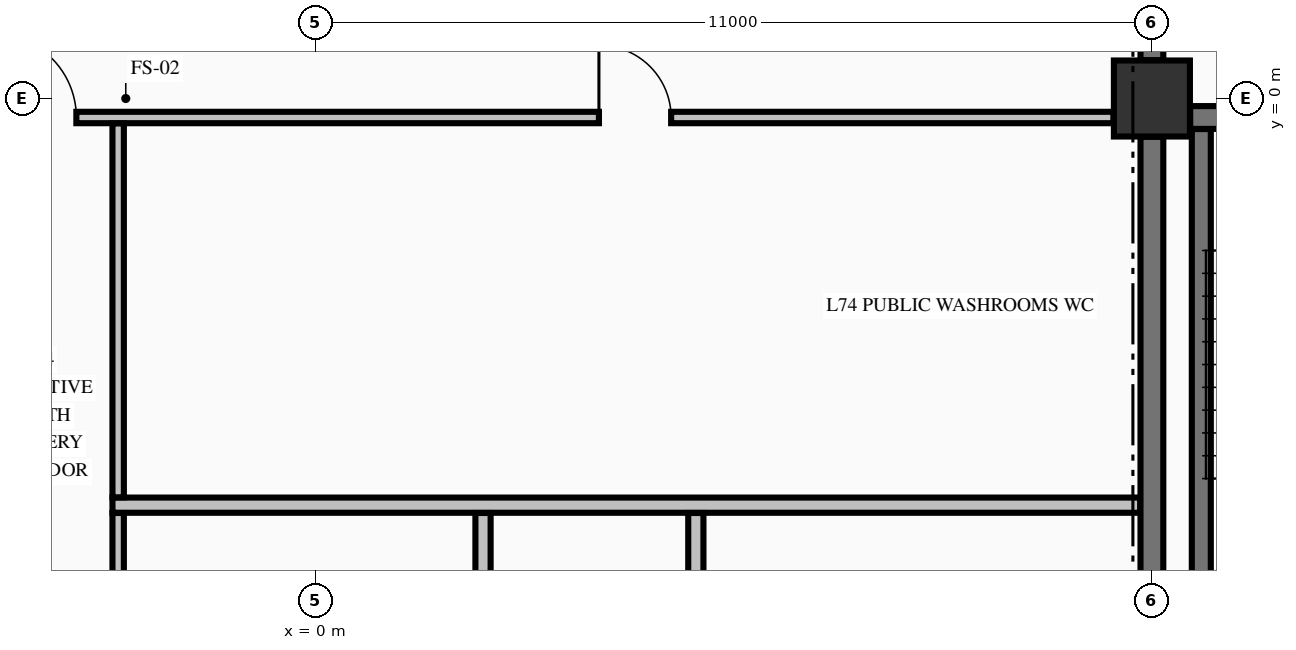
"""IFC4 building model, lengths in metres.
Left out: names, types, materials, properties, quantities, classifications, styles, units other than length and angle.
Written with IfcOpenShell. Run it as: python <this file> out.ifc"""

import sys

from ifc_helpers import new_model, si_unit, direction, frame, frame_2d, origin, origin_2d, place, context, subcontext, project, spatial, rectangle, extrude, element, fill, save


model = new_model("IFC4")
c1 = context("Model", 3, precision=1e-05, world=origin(), true_north=direction((0.0, 1.0)))
c2 = subcontext(c1, "Body", "Model", "MODEL_VIEW")
j1 = project(units=[si_unit("LENGTHUNIT", "METRE"), si_unit("PLANEANGLEUNIT", "RADIAN")], contexts=[c1])
p1 = place(None, origin())
s1 = spatial("IfcSite", under=j1, at=p1, CompositionType="ELEMENT")
p2 = place(p1, origin())
s2 = spatial("IfcBuilding", under=s1, at=p2, CompositionType="ELEMENT")
p3 = place(p2, frame((0.0, 0.0, 278.06)))
s3 = spatial("IfcBuildingStorey", under=s2, at=p3, CompositionType="ELEMENT", Elevation=278.06)
p4 = place(p3, frame((11.0, 0.0, -0.425), z_axis=(0.0, 0.0, 1.0), x_axis=(1.0, 0.0, 0.0)))
e1 = element("IfcColumn", 1, at=p4, inside=s3, PredefinedType="COLUMN", context=c2, shape_type="SweptSolid", body=[
    extrude(rectangle(XDim=1.0, YDim=1.0, at=origin_2d()), origin(), (0.0, 0.0, 1.0), 3.84),
])
p5 = place(p3, frame((11.504, -0.25, 0.0), z_axis=(0.0, 0.0, 1.0), x_axis=(1.0, 0.0, 0.0)))
e2 = element("IfcWall", 2, at=p5, inside=s3, PredefinedType="SHEAR", context=c2, shape_type="SweptSolid", body=[
    extrude(rectangle(XDim=3.371, YDim=0.3, at=frame_2d((1.686, 0.0))), origin(), (0.0, 0.0, 1.0), 3.415),
])
p6 = place(p5, frame((1.096, 0.0, 0.0)))
e3 = element("IfcOpeningElement", 3, at=p6, cuts=e2, PredefinedType="OPENING", context=c2, shape_type="SweptSolid", body=[
    extrude(rectangle(XDim=1.1, YDim=2.15, at=frame_2d((0.55, 1.075))), frame((0.0, 0.16, 0.0), z_axis=(0.0, -1.0, 0.0), x_axis=(1.0, 0.0, 0.0)), (0.0, 0.0, 1.0), 0.32),
])
p7 = place(p3, frame((-2.675, -5.35, 0.0), z_axis=(0.0, 0.0, 1.0), x_axis=(1.0, 0.0, 0.0)))
e4 = element("IfcWall", 4, at=p7, inside=s3, PredefinedType="PARTITIONING", context=c2, shape_type="SweptSolid", body=[
    extrude(rectangle(XDim=13.522, YDim=0.2, at=frame_2d((6.761, 0.0))), origin(), (0.0, 0.0, 1.0), 3.415),
])
p8 = place(p3, frame((-10.494, -0.25, 0.0), z_axis=(0.0, 0.0, 1.0), x_axis=(1.0, 0.0, 0.0)))
e5 = element("IfcWall", 5, at=p8, inside=s3, PredefinedType="PARTITIONING", context=c2, shape_type="SweptSolid", body=[
    extrude(rectangle(XDim=20.988, YDim=0.15, at=frame_2d((10.494, 0.0))), origin(), (0.0, 0.0, 1.0), 3.415),
])
p9 = place(p8, frame((6.244, 0.0, 0.0)))
e6 = element("IfcOpeningElement", 6, at=p9, cuts=e5, PredefinedType="OPENING", context=c2, shape_type="SweptSolid", body=[
    extrude(rectangle(XDim=1.1, YDim=2.15, at=frame_2d((0.55, 1.075))), frame((0.0, 0.085, 0.0), z_axis=(0.0, -1.0, 0.0), x_axis=(1.0, 0.0, 0.0)), (0.0, 0.0, 1.0), 0.17),
])
p10 = place(p8, frame((2.069, 0.0, 0.0)))
e7 = element("IfcOpeningElement", 7, at=p10, cuts=e5, PredefinedType="OPENING", context=c2, shape_type="SweptSolid", body=[
    extrude(rectangle(XDim=1.05, YDim=2.15, at=frame_2d((0.525, 1.075))), frame((0.0, 0.085, 0.0), z_axis=(0.0, -1.0, 0.0), x_axis=(1.0, 0.0, 0.0)), (0.0, 0.0, 1.0), 0.17),
])
p11 = place(p8, frame((14.219, 0.0, 0.0)))
e8 = element("IfcOpeningElement", 8, at=p11, cuts=e5, PredefinedType="OPENING", context=c2, shape_type="SweptSolid", body=[
    extrude(rectangle(XDim=0.95, YDim=2.15, at=frame_2d((0.475, 1.075))), frame((0.0, 0.085, 0.0), z_axis=(0.0, -1.0, 0.0), x_axis=(1.0, 0.0, 0.0)), (0.0, 0.0, 1.0), 0.17),
])
p12 = place(p3, frame((11.0, -9.446, 0.0), z_axis=(0.0, 0.0, 1.0), x_axis=(0.0, 1.0, 0.0)))
e9 = element("IfcWall", 9, at=p12, inside=s3, PredefinedType="SHEAR", context=c2, shape_type="SweptSolid", body=[
    extrude(rectangle(XDim=8.942, YDim=0.3, at=frame_2d((4.471, 0.0))), origin(), (0.0, 0.0, 1.0), 3.415),
])
p13 = place(p3, frame((11.0, 0.504, 0.0), z_axis=(0.0, 0.0, 1.0), x_axis=(0.0, 1.0, 0.0)))
e10 = element("IfcWall", 10, at=p13, inside=s3, PredefinedType="SHEAR", context=c2, shape_type="SweptSolid", body=[
    extrude(rectangle(XDim=2.244, YDim=0.3, at=frame_2d((1.122, 0.0))), origin(), (0.0, 0.0, 1.0), 3.415),
])
p14 = place(p13, frame((0.596, 0.0, 0.0)))
e11 = element("IfcOpeningElement", 11, at=p14, cuts=e10, PredefinedType="OPENING", context=c2, shape_type="SweptSolid", body=[
    extrude(rectangle(XDim=1.1, YDim=2.15, at=frame_2d((0.55, 1.075))), frame((0.0, 0.16, 0.0), z_axis=(0.0, -1.0, 0.0), x_axis=(1.0, 0.0, 0.0)), (0.0, 0.0, 1.0), 0.32),
])
p15 = place(p3, frame((11.65, -9.798, 0.0), z_axis=(0.0, 0.0, 1.0), x_axis=(0.0, 1.0, 0.0)))
e12 = element("IfcWall", 12, at=p15, inside=s3, PredefinedType="SOLIDWALL", context=c2, shape_type="SweptSolid", body=[
    extrude(rectangle(XDim=9.396, YDim=0.25, at=frame_2d((4.698, 0.0))), origin(), (0.0, 0.0, 1.0), 3.415),
])
p16 = place(p3, frame((-2.6, -9.872, 0.0), z_axis=(0.0, 0.0, 1.0), x_axis=(0.0, 1.0, 0.0)))
e13 = element("IfcWall", 13, at=p16, inside=s3, PredefinedType="PARTITIONING", context=c2, shape_type="SweptSolid", body=[
    extrude(rectangle(XDim=4.419, YDim=0.15, at=frame_2d((2.209, 0.0))), origin(), (0.0, 0.0, 1.0), 3.415),
])
p17 = place(p16, frame((2.597, 0.0, 0.0)))
e14 = element("IfcOpeningElement", 14, at=p17, cuts=e13, PredefinedType="OPENING", context=c2, shape_type="SweptSolid", body=[
    extrude(rectangle(XDim=0.95, YDim=2.15, at=frame_2d((0.475, 1.075))), frame((0.0, 0.085, 0.0), z_axis=(0.0, -1.0, 0.0), x_axis=(1.0, 0.0, 0.0)), (0.0, 0.0, 1.0), 0.17),
])
p18 = place(p3, frame((-2.6, -5.247, 0.0), z_axis=(0.0, 0.0, 1.0), x_axis=(0.0, 1.0, 0.0)))
e15 = element("IfcWall", 15, at=p18, inside=s3, PredefinedType="PARTITIONING", context=c2, shape_type="SweptSolid", body=[
    extrude(rectangle(XDim=4.919, YDim=0.15, at=frame_2d((2.459, 0.0))), origin(), (0.0, 0.0, 1.0), 3.415),
])
for number, where, z_axis, x_axis in (
    (16, (2.2, -9.872, 0.0), (0.0, 0.0, 1.0), (0.0, 1.0, 0.0)),
    (17, (5.0, -9.872, 0.0), (0.0, 0.0, 1.0), (0.0, 1.0, 0.0)),
):
    element("IfcWall", number, at=place(p3, frame(where, z_axis=z_axis, x_axis=x_axis)), inside=s3, PredefinedType="PARTITIONING", context=c2, shape_type="SweptSolid", body=[
        extrude(rectangle(XDim=4.419, YDim=0.2, at=frame_2d((2.209, 0.0))), origin(), (0.0, 0.0, 1.0), 3.415),
    ])
p19 = place(p9, origin())
e18 = element("IfcDoor", 18, at=p19, inside=s3, OperationType="SINGLE_SWING_LEFT", PredefinedType="DOOR", context=c2, shape_type="SweptSolid", body=[
    extrude(rectangle(XDim=1.1, YDim=2.15, at=frame_2d((0.55, 1.075))), frame((0.0, 0.025, 0.0), z_axis=(0.0, -1.0, 0.0), x_axis=(1.0, 0.0, 0.0)), (0.0, 0.0, 1.0), 0.05),
])
fill(e6, e18)
p20 = place(p11, origin())
e19 = element("IfcDoor", 19, at=p20, inside=s3, OperationType="SINGLE_SWING_LEFT", PredefinedType="DOOR", context=c2, shape_type="SweptSolid", body=[
    extrude(rectangle(XDim=0.95, YDim=2.15, at=frame_2d((0.475, 1.075))), frame((0.0, 0.025, 0.0), z_axis=(0.0, -1.0, 0.0), x_axis=(1.0, 0.0, 0.0)), (0.0, 0.0, 1.0), 0.05),
])
fill(e8, e19)
save(model, sys.argv[1])
